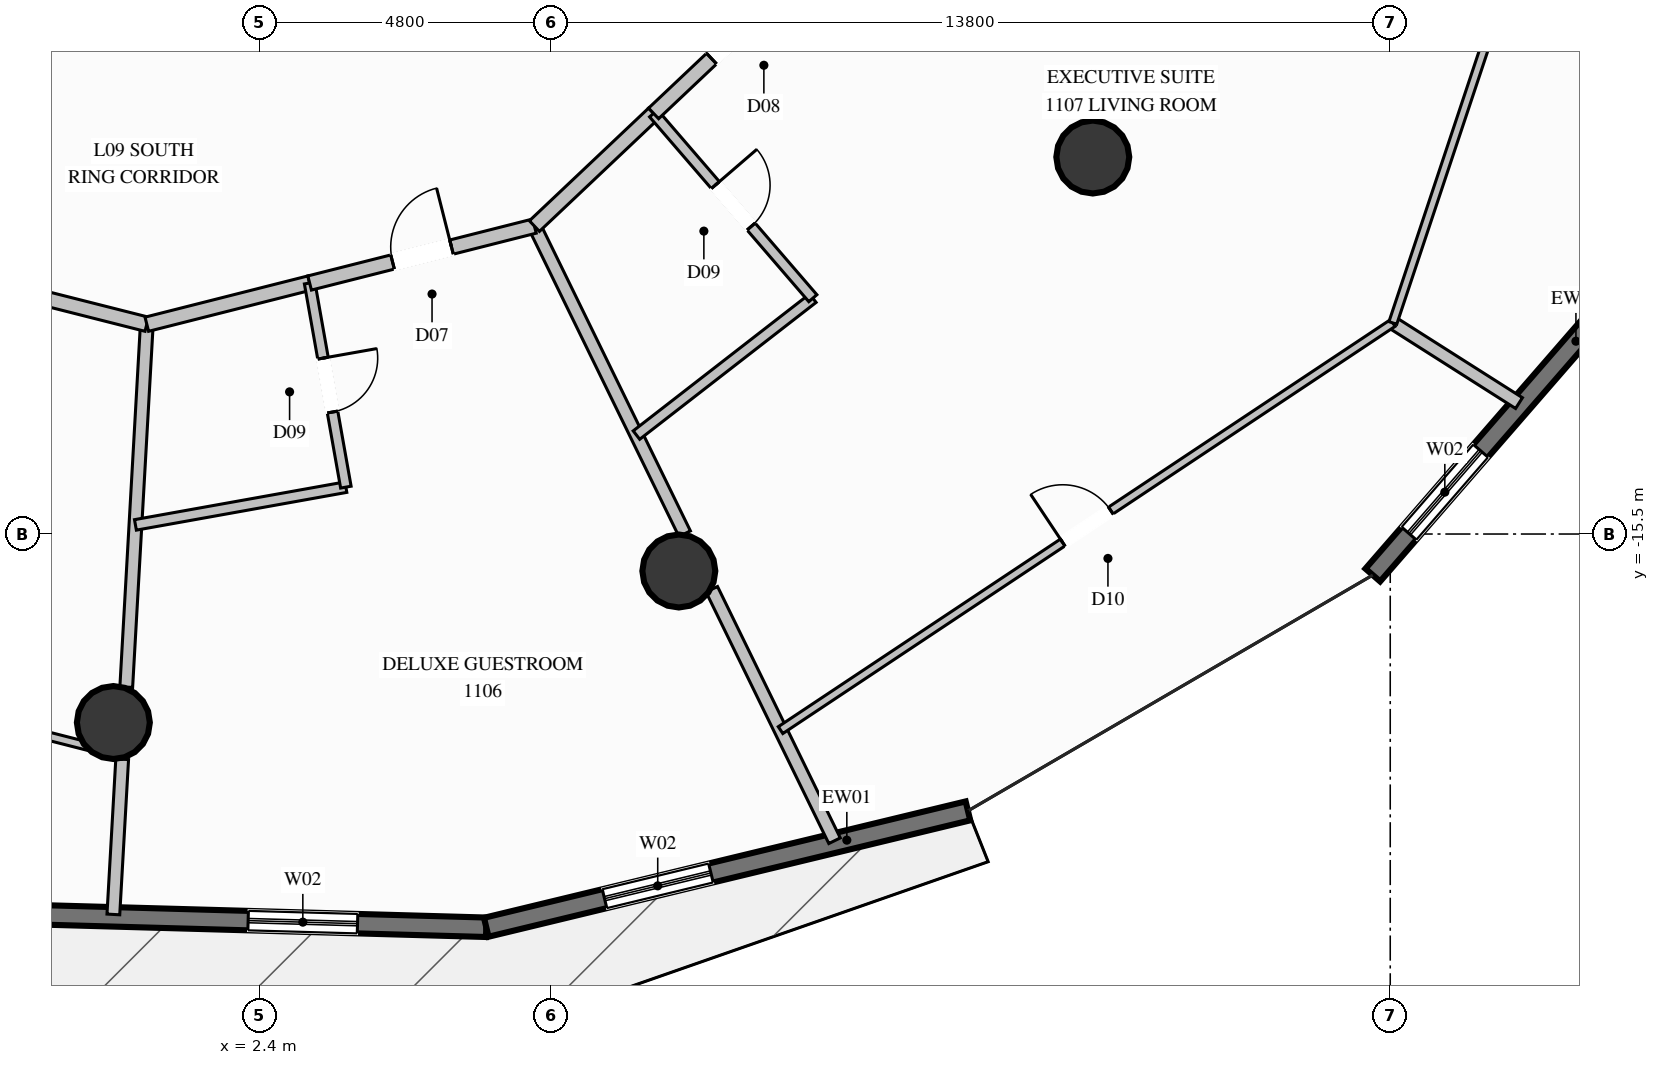
"""IFC4 building model, lengths in metres.
Left out: names, types, materials, properties, quantities, classifications, styles, units other than length and angle.
Written with IfcOpenShell. Run it as: python <this file> out.ifc"""

import sys

from ifc_helpers import new_model, si_unit, direction, frame, frame_2d, origin, origin_2d, place, context, subcontext, project, spatial, rectangle, circle, extrude, element, fill, save


model = new_model("IFC4")
c1 = context("Model", 3, precision=1e-05, world=origin(), true_north=direction((0.0, 1.0)))
c2 = subcontext(c1, "Body", "Model", "MODEL_VIEW")
j1 = project(units=[si_unit("LENGTHUNIT", "METRE"), si_unit("PLANEANGLEUNIT", "RADIAN")], contexts=[c1])
p1 = place(None, origin())
s1 = spatial("IfcSite", under=j1, at=p1, CompositionType="ELEMENT")
p2 = place(p1, origin())
s2 = spatial("IfcBuilding", under=s1, at=p2, CompositionType="ELEMENT")
p3 = place(p2, frame((0.0, 0.0, 42.8)))
s3 = spatial("IfcBuildingStorey", under=s2, at=p3, CompositionType="ELEMENT", Elevation=42.8)
for number, where, z_axis, x_axis in (
    (1, (0.0, -18.6, 0.0), (0.0, 0.0, 1.0), (1.0, 0.0, 0.0)),
    (2, (9.3, -16.108, 0.0), (0.0, 0.0, 1.0), (1.0, 0.0, 0.0)),
    (3, (16.108, -9.3, 0.0), (0.0, 0.0, 1.0), (1.0, 0.0, 0.0)),
):
    element("IfcColumn", number, at=place(p3, frame(where, z_axis=z_axis, x_axis=x_axis)), inside=s3, PredefinedType="COLUMN", context=c2, shape_type="SweptSolid", body=[
        extrude(circle(Radius=0.6, at=origin_2d()), origin(), (0.0, 0.0, 1.0), 3.6),
    ])
p4 = place(p3, frame((6.133, -21.967, 0.0), z_axis=(0.0, 0.0, 1.0), x_axis=(-0.999609369541, 0.027948315271, 0.0)))
e4 = element("IfcWall", 4, at=p4, inside=s3, PredefinedType="SOLIDWALL", context=c2, shape_type="SweptSolid", body=[
    extrude(rectangle(XDim=8.412, YDim=0.32, at=frame_2d((4.206, 0.0))), origin(), (0.0, 0.0, 1.0), 3.34),
])
p5 = place(p4, frame((2.118, 0.0, 0.35)))
e5 = element("IfcOpeningElement", 5, at=p5, cuts=e4, PredefinedType="OPENING", context=c2, shape_type="SweptSolid", body=[
    extrude(rectangle(XDim=1.8, YDim=2.6, at=frame_2d((0.9, 1.3))), frame((0.0, 0.17, 0.0), z_axis=(0.0, -1.0, 0.0), x_axis=(1.0, 0.0, 0.0)), (0.0, 0.0, 1.0), 0.34),
])
p6 = place(p3, frame((14.055, -20.053, 0.0), z_axis=(0.0, 0.0, 1.0), x_axis=(-0.97202940664, -0.234859176161, 0.0)))
e6 = element("IfcWall", 6, at=p6, inside=s3, PredefinedType="SOLIDWALL", context=c2, shape_type="SweptSolid", body=[
    extrude(rectangle(XDim=8.15, YDim=0.32, at=frame_2d((4.075, 0.0))), origin(), (0.0, 0.0, 1.0), 3.34),
])
p7 = place(p6, frame((4.349, 0.0, 0.35)))
e7 = element("IfcOpeningElement", 7, at=p7, cuts=e6, PredefinedType="OPENING", context=c2, shape_type="SweptSolid", body=[
    extrude(rectangle(XDim=1.8, YDim=2.6, at=frame_2d((0.9, 1.3))), frame((0.0, 0.17, 0.0), z_axis=(0.0, -1.0, 0.0), x_axis=(1.0, 0.0, 0.0)), (0.0, 0.0, 1.0), 0.34),
])
p8 = place(p3, frame((25.456, -10.715, 0.0), z_axis=(0.0, 0.0, 1.0), x_axis=(-0.655814261076, -0.754922284059, 0.0)))
e8 = element("IfcWall", 8, at=p8, inside=s3, PredefinedType="SOLIDWALL", context=c2, shape_type="SweptSolid", body=[
    extrude(rectangle(XDim=7.232, YDim=0.32, at=frame_2d((3.616, 0.0))), origin(), (0.0, 0.0, 1.0), 3.34),
])
p9 = place(p8, frame((4.526, 0.0, 0.35)))
e9 = element("IfcOpeningElement", 9, at=p9, cuts=e8, PredefinedType="OPENING", context=c2, shape_type="SweptSolid", body=[
    extrude(rectangle(XDim=1.8, YDim=2.6, at=frame_2d((0.9, 1.3))), frame((0.0, 0.17, 0.0), z_axis=(0.0, -1.0, 0.0), x_axis=(1.0, 0.0, 0.0)), (0.0, 0.0, 1.0), 0.34),
])
p10 = place(p3, frame((0.55, -12.05, 0.0), z_axis=(0.0, 0.0, 1.0), x_axis=(-0.0565763109, -0.998398277765, 0.0)))
e10 = element("IfcWall", 10, at=p10, inside=s3, PredefinedType="PARTITIONING", context=c2, shape_type="SweptSolid", body=[
    extrude(rectangle(XDim=5.977, YDim=0.21, at=frame_2d((2.988, 0.0))), origin(), (0.0, 0.0, 1.0), 3.34),
])
p11 = place(p3, frame((0.145, -19.203, 0.0), z_axis=(0.0, 0.0, 1.0), x_axis=(-0.056707225594, -0.998390850602, 0.0)))
e11 = element("IfcWall", 11, at=p11, inside=s3, PredefinedType="PARTITIONING", context=c2, shape_type="SweptSolid", body=[
    extrude(rectangle(XDim=2.557, YDim=0.21, at=frame_2d((1.279, 0.0))), origin(), (0.0, 0.0, 1.0), 3.34),
])
p12 = place(p3, frame((6.925, -10.436, 0.0), z_axis=(0.0, 0.0, 1.0), x_axis=(0.438868681405, -0.898551211942, 0.0)))
e12 = element("IfcWall", 12, at=p12, inside=s3, PredefinedType="PARTITIONING", context=c2, shape_type="SweptSolid", body=[
    extrude(rectangle(XDim=5.63, YDim=0.21, at=frame_2d((2.815, 0.0))), origin(), (0.0, 0.0, 1.0), 2.708),
])
p13 = place(p3, frame((9.842, -16.409, 0.0), z_axis=(0.0, 0.0, 1.0), x_axis=(0.438768549371, -0.89860011133, 0.0)))
e13 = element("IfcWall", 13, at=p13, inside=s3, PredefinedType="PARTITIONING", context=c2, shape_type="SweptSolid", body=[
    extrude(rectangle(XDim=4.602, YDim=0.21, at=frame_2d((2.301, 0.0))), origin(), (0.0, 0.0, 1.0), 3.34),
])
p14 = place(p3, frame((-5.825, -10.436, 0.0), z_axis=(0.0, 0.0, 1.0), x_axis=(0.969413132073, -0.245434674331, 0.0)))
e14 = element("IfcWall", 14, at=p14, inside=s3, PredefinedType="PARTITIONING", context=c2, shape_type="SweptSolid", body=[
    extrude(rectangle(XDim=6.576, YDim=0.24, at=frame_2d((3.288, 0.0))), origin(), (0.0, 0.0, 1.0), 2.918),
])
p15 = place(p3, frame((-9.563, -16.656, 0.0), z_axis=(0.0, 0.0, 1.0), x_axis=(0.968932863531, -0.247323888796, 0.0)))
e15 = element("IfcWall", 15, at=p15, inside=s3, PredefinedType="PARTITIONING", context=c2, shape_type="SweptSolid", body=[
    extrude(rectangle(XDim=10.023, YDim=0.135, at=frame_2d((5.012, 0.0))), origin(), (0.0, 0.0, 1.0), 2.791),
])
p16 = place(p15, frame((4.537, 0.0, 0.0)))
e16 = element("IfcOpeningElement", 16, at=p16, cuts=e15, PredefinedType="OPENING", context=c2, shape_type="SweptSolid", body=[
    extrude(rectangle(XDim=0.95, YDim=2.1, at=frame_2d((0.475, 1.05))), frame((0.0, 0.078, 0.0), z_axis=(0.0, -1.0, 0.0), x_axis=(1.0, 0.0, 0.0)), (0.0, 0.0, 1.0), 0.155),
])
p17 = place(p3, frame((0.55, -12.05, 0.0), z_axis=(0.0, 0.0, 1.0), x_axis=(0.969415576054, 0.245425020941, 0.0)))
e17 = element("IfcWall", 17, at=p17, inside=s3, PredefinedType="PARTITIONING", context=c2, shape_type="SweptSolid", body=[
    extrude(rectangle(XDim=2.762, YDim=0.24, at=frame_2d((1.381, 0.0))), origin(), (0.0, 0.0, 1.0), 2.918),
])
p18 = place(p3, frame((0.363, -15.35, 0.0), z_axis=(0.0, 0.0, 1.0), x_axis=(0.984276159759, 0.176636466593, 0.0)))
e18 = element("IfcWall", 18, at=p18, inside=s3, PredefinedType="PLUMBINGWALL", context=c2, shape_type="SweptSolid", body=[
    extrude(rectangle(XDim=3.516, YDim=0.175, at=frame_2d((1.758, 0.0))), origin(), (0.0, 0.0, 1.0), 3.34),
])
p19 = place(p3, frame((3.228, -11.372, 0.0), z_axis=(0.0, 0.0, 1.0), x_axis=(0.174794237524, -0.984604984005, 0.0)))
e19 = element("IfcWall", 19, at=p19, inside=s3, PredefinedType="PLUMBINGWALL", context=c2, shape_type="SweptSolid", body=[
    extrude(rectangle(XDim=3.409, YDim=0.175, at=frame_2d((1.705, 0.0))), origin(), (0.0, 0.0, 1.0), 3.34),
])
p20 = place(p19, frame((1.255, 0.0, 0.0)))
e20 = element("IfcOpeningElement", 20, at=p20, cuts=e19, PredefinedType="OPENING", context=c2, shape_type="SweptSolid", body=[
    extrude(rectangle(XDim=0.9, YDim=2.1, at=frame_2d((0.45, 1.05))), frame((0.0, 0.098, 0.0), z_axis=(0.0, -1.0, 0.0), x_axis=(1.0, 0.0, 0.0)), (0.0, 0.0, 1.0), 0.195),
])
p21 = place(p3, frame((3.228, -11.372, 0.0), z_axis=(0.0, 0.0, 1.0), x_axis=(0.969411361696, 0.245441666826, 0.0)))
e21 = element("IfcWall", 21, at=p21, inside=s3, PredefinedType="PARTITIONING", context=c2, shape_type="SweptSolid", body=[
    extrude(rectangle(XDim=3.814, YDim=0.24, at=frame_2d((1.907, 0.0))), origin(), (0.0, 0.0, 1.0), 2.918),
])
p22 = place(p21, frame((1.407, 0.0, 0.0)))
e22 = element("IfcOpeningElement", 22, at=p22, cuts=e21, PredefinedType="OPENING", context=c2, shape_type="SweptSolid", body=[
    extrude(rectangle(XDim=1.0, YDim=2.2, at=frame_2d((0.5, 1.1))), frame((0.0, 0.13, 0.0), z_axis=(0.0, -1.0, 0.0), x_axis=(1.0, 0.0, 0.0)), (0.0, 0.0, 1.0), 0.26),
])
p23 = place(p3, frame((6.925, -10.436, 0.0), z_axis=(0.0, 0.0, 1.0), x_axis=(0.726651583854, 0.687006168591, 0.0)))
e23 = element("IfcWall", 23, at=p23, inside=s3, PredefinedType="PARTITIONING", context=c2, shape_type="SweptSolid", body=[
    extrude(rectangle(XDim=2.697, YDim=0.24, at=frame_2d((1.349, 0.0))), origin(), (0.0, 0.0, 1.0), 3.34),
])
p24 = place(p3, frame((8.603, -13.873, 0.0), z_axis=(0.0, 0.0, 1.0), x_axis=(0.790046287632, 0.613047195082, 0.0)))
e24 = element("IfcWall", 24, at=p24, inside=s3, PredefinedType="PLUMBINGWALL", context=c2, shape_type="SweptSolid", body=[
    extrude(rectangle(XDim=3.672, YDim=0.175, at=frame_2d((1.836, 0.0))), origin(), (0.0, 0.0, 1.0), 3.34),
])
p25 = place(p3, frame((8.885, -8.583, 0.0), z_axis=(0.0, 0.0, 1.0), x_axis=(0.6527987627, -0.757531369263, 0.0)))
e25 = element("IfcWall", 25, at=p25, inside=s3, PredefinedType="PLUMBINGWALL", context=c2, shape_type="SweptSolid", body=[
    extrude(rectangle(XDim=4.012, YDim=0.175, at=frame_2d((2.006, 0.0))), origin(), (0.0, 0.0, 1.0), 3.34),
])
p26 = place(p25, frame((1.556, 0.0, 0.0)))
e26 = element("IfcOpeningElement", 26, at=p26, cuts=e25, PredefinedType="OPENING", context=c2, shape_type="SweptSolid", body=[
    extrude(rectangle(XDim=0.9, YDim=2.1, at=frame_2d((0.45, 1.05))), frame((0.0, 0.098, 0.0), z_axis=(0.0, -1.0, 0.0), x_axis=(1.0, 0.0, 0.0)), (0.0, 0.0, 1.0), 0.195),
])
p27 = place(p3, frame((21.043, -12.029, 0.0), z_axis=(0.0, 0.0, 1.0), x_axis=(0.844131479441, -0.536136219087, 0.0)))
e27 = element("IfcWall", 27, at=p27, inside=s3, PredefinedType="PARTITIONING", context=c2, shape_type="SweptSolid", body=[
    extrude(rectangle(XDim=2.458, YDim=0.21, at=frame_2d((1.229, 0.0))), origin(), (0.0, 0.0, 1.0), 3.34),
])
p28 = place(p3, frame((8.885, -8.583, 0.0), z_axis=(0.0, 0.0, 1.0), x_axis=(0.726816794063, 0.686831382413, 0.0)))
e28 = element("IfcWall", 28, at=p28, inside=s3, PredefinedType="PARTITIONING", context=c2, shape_type="SweptSolid", body=[
    extrude(rectangle(XDim=3.725, YDim=0.24, at=frame_2d((1.862, 0.0))), origin(), (0.0, 0.0, 1.0), 3.34),
])
p29 = place(p28, frame((1.312, 0.0, 0.0)))
e29 = element("IfcOpeningElement", 29, at=p29, cuts=e28, PredefinedType="OPENING", context=c2, shape_type="SweptSolid", body=[
    extrude(rectangle(XDim=1.1, YDim=2.3, at=frame_2d((0.55, 1.15))), frame((0.0, 0.13, 0.0), z_axis=(0.0, -1.0, 0.0), x_axis=(1.0, 0.0, 0.0)), (0.0, 0.0, 1.0), 0.26),
])
p30 = place(p3, frame((10.973, -18.725, 0.0), z_axis=(0.0, 0.0, 1.0), x_axis=(0.832711261184, 0.553707463827, 0.0)))
e30 = element("IfcWall", 30, at=p30, inside=s3, PredefinedType="PARTITIONING", context=c2, shape_type="SweptSolid", body=[
    extrude(rectangle(XDim=12.093, YDim=0.135, at=frame_2d((6.046, 0.0))), origin(), (0.0, 0.0, 1.0), 3.34),
])
p31 = place(p30, frame((5.572, 0.0, 0.0)))
e31 = element("IfcOpeningElement", 31, at=p31, cuts=e30, PredefinedType="OPENING", context=c2, shape_type="SweptSolid", body=[
    extrude(rectangle(XDim=0.95, YDim=2.1, at=frame_2d((0.475, 1.05))), frame((0.0, 0.078, 0.0), z_axis=(0.0, -1.0, 0.0), x_axis=(1.0, 0.0, 0.0)), (0.0, 0.0, 1.0), 0.155),
])
p32 = place(p3, frame((21.043, -12.029, 0.0), z_axis=(0.0, 0.0, 1.0), x_axis=(0.316112232613, 0.948721801369, 0.0)))
e32 = element("IfcWall", 32, at=p32, inside=s3, PredefinedType="PARTITIONING", context=c2, shape_type="SweptSolid", body=[
    extrude(rectangle(XDim=12.679, YDim=0.135, at=frame_2d((6.34, 0.0))), origin(), (0.0, 0.0, 1.0), 3.34),
])
p33 = place(p32, frame((5.865, 0.0, 0.0)))
e33 = element("IfcOpeningElement", 33, at=p33, cuts=e32, PredefinedType="OPENING", context=c2, shape_type="SweptSolid", body=[
    extrude(rectangle(XDim=0.95, YDim=2.1, at=frame_2d((0.475, 1.05))), frame((0.0, 0.078, 0.0), z_axis=(0.0, -1.0, 0.0), x_axis=(1.0, 0.0, 0.0)), (0.0, 0.0, 1.0), 0.155),
])
p34 = place(p5, origin())
e34 = element("IfcWindow", 34, at=p34, inside=s3, PartitioningType="SINGLE_PANEL", PredefinedType="WINDOW", context=c2, shape_type="SweptSolid", body=[
    extrude(rectangle(XDim=1.8, YDim=2.6, at=frame_2d((0.9, 1.3))), frame((0.0, 0.03, 0.0), z_axis=(0.0, -1.0, 0.0), x_axis=(1.0, 0.0, 0.0)), (0.0, 0.0, 1.0), 0.06),
])
fill(e5, e34)
p35 = place(p7, origin())
e35 = element("IfcWindow", 35, at=p35, inside=s3, PartitioningType="SINGLE_PANEL", PredefinedType="WINDOW", context=c2, shape_type="SweptSolid", body=[
    extrude(rectangle(XDim=1.8, YDim=2.6, at=frame_2d((0.9, 1.3))), frame((0.0, 0.03, 0.0), z_axis=(0.0, -1.0, 0.0), x_axis=(1.0, 0.0, 0.0)), (0.0, 0.0, 1.0), 0.06),
])
fill(e7, e35)
p36 = place(p9, origin())
e36 = element("IfcWindow", 36, at=p36, inside=s3, PartitioningType="SINGLE_PANEL", PredefinedType="WINDOW", context=c2, shape_type="SweptSolid", body=[
    extrude(rectangle(XDim=1.8, YDim=2.6, at=frame_2d((0.9, 1.3))), frame((0.0, 0.03, 0.0), z_axis=(0.0, -1.0, 0.0), x_axis=(1.0, 0.0, 0.0)), (0.0, 0.0, 1.0), 0.06),
])
fill(e9, e36)
p37 = place(p20, origin())
e37 = element("IfcDoor", 37, at=p37, inside=s3, OperationType="SINGLE_SWING_LEFT", PredefinedType="DOOR", context=c2, shape_type="SweptSolid", body=[
    extrude(rectangle(XDim=0.9, YDim=2.1, at=frame_2d((0.45, 1.05))), frame((0.0, 0.025, 0.0), z_axis=(0.0, -1.0, 0.0), x_axis=(1.0, 0.0, 0.0)), (0.0, 0.0, 1.0), 0.05),
])
fill(e20, e37)
p38 = place(p22, origin())
e38 = element("IfcDoor", 38, at=p38, inside=s3, OperationType="SINGLE_SWING_RIGHT", PredefinedType="DOOR", context=c2, shape_type="SweptSolid", body=[
    extrude(rectangle(XDim=1.0, YDim=2.2, at=frame_2d((0.5, 1.1))), frame((0.0, 0.025, 0.0), z_axis=(0.0, -1.0, 0.0), x_axis=(1.0, 0.0, 0.0)), (0.0, 0.0, 1.0), 0.05),
])
fill(e22, e38)
p39 = place(p26, origin())
e39 = element("IfcDoor", 39, at=p39, inside=s3, OperationType="SINGLE_SWING_LEFT", PredefinedType="DOOR", context=c2, shape_type="SweptSolid", body=[
    extrude(rectangle(XDim=0.9, YDim=2.1, at=frame_2d((0.45, 1.05))), frame((0.0, 0.025, 0.0), z_axis=(0.0, -1.0, 0.0), x_axis=(1.0, 0.0, 0.0)), (0.0, 0.0, 1.0), 0.05),
])
fill(e26, e39)
p40 = place(p29, origin())
e40 = element("IfcDoor", 40, at=p40, inside=s3, OperationType="SINGLE_SWING_RIGHT", PredefinedType="DOOR", context=c2, shape_type="SweptSolid", body=[
    extrude(rectangle(XDim=1.1, YDim=2.3, at=frame_2d((0.55, 1.15))), frame((0.0, 0.025, 0.0), z_axis=(0.0, -1.0, 0.0), x_axis=(1.0, 0.0, 0.0)), (0.0, 0.0, 1.0), 0.05),
])
fill(e29, e40)
p41 = place(p31, origin())
e41 = element("IfcDoor", 41, at=p41, inside=s3, OperationType="SINGLE_SWING_LEFT", PredefinedType="DOOR", context=c2, shape_type="SweptSolid", body=[
    extrude(rectangle(XDim=0.95, YDim=2.1, at=frame_2d((0.475, 1.05))), frame((0.0, 0.025, 0.0), z_axis=(0.0, -1.0, 0.0), x_axis=(1.0, 0.0, 0.0)), (0.0, 0.0, 1.0), 0.05),
])
fill(e31, e41)
save(model, sys.argv[1])
